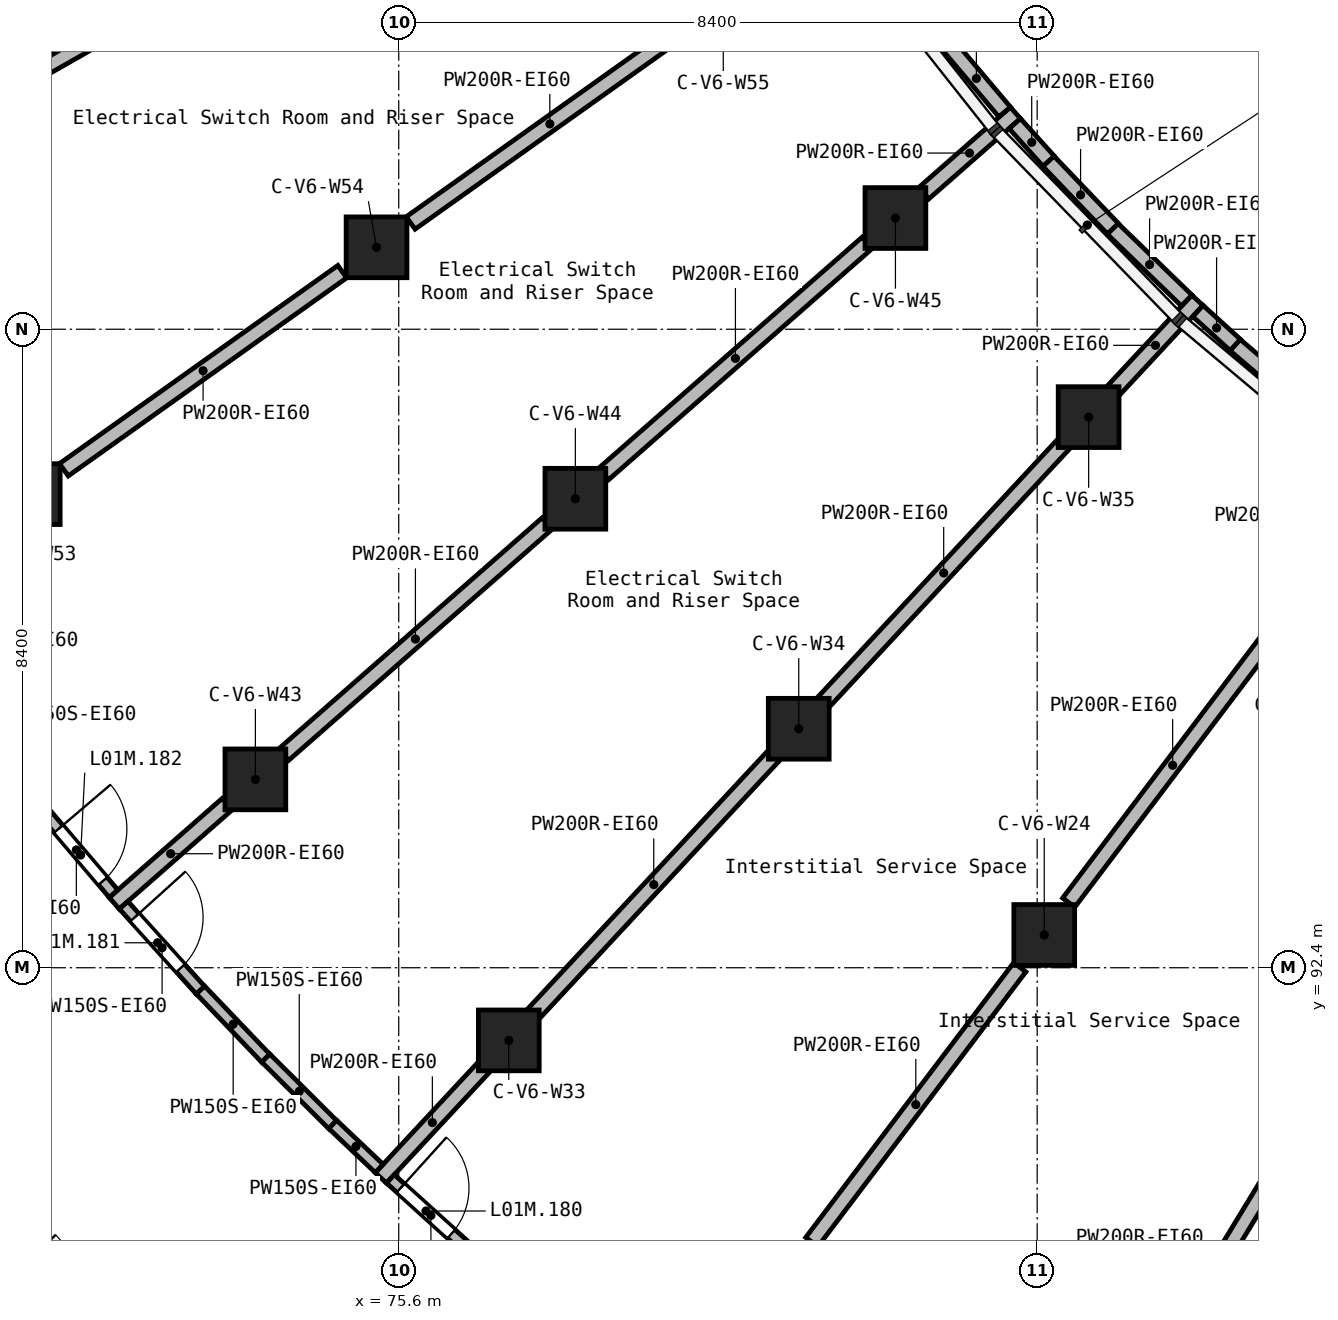
"""IFC4 building model, lengths in metres.
Left out: names, types, materials, properties, quantities, classifications, styles, units other than length and angle.
Written with IfcOpenShell. Run it as: python <this file> out.ifc"""

import sys

from ifc_helpers import new_model, si_unit, direction, frame, frame_2d, origin, origin_2d, place, context, subcontext, project, spatial, rectangle, extrude, element, fill, save


model = new_model("IFC4")
c1 = context("Model", 3, precision=1e-05, world=origin(), true_north=direction((0.0, 1.0)))
c2 = subcontext(c1, "Body", "Model", "MODEL_VIEW")
j1 = project(units=[si_unit("LENGTHUNIT", "METRE"), si_unit("PLANEANGLEUNIT", "RADIAN")], contexts=[c1])
p1 = place(None, origin())
s1 = spatial("IfcSite", under=j1, at=p1, CompositionType="ELEMENT")
p2 = place(p1, origin())
s2 = spatial("IfcBuilding", under=s1, at=p2, CompositionType="ELEMENT")
p3 = place(p2, frame((0.0, 0.0, 9.9)))
s3 = spatial("IfcBuildingStorey", under=s2, at=p3, CompositionType="ELEMENT", Elevation=9.9)
for number, where, z_axis, x_axis in (
    (1, (70.745, 98.631, 0.0), (0.0, 0.0, 1.0), (1.0, 0.0, 0.0)),
    (2, (73.714, 94.878, 0.0), (0.0, 0.0, 1.0), (1.0, 0.0, 0.0)),
    (3, (75.308, 101.878, 0.0), (0.0, 0.0, 1.0), (1.0, 0.0, 0.0)),
    (4, (77.048, 91.444, 0.0), (0.0, 0.0, 1.0), (1.0, 0.0, 0.0)),
    (5, (77.924, 98.57, 0.0), (0.0, 0.0, 1.0), (1.0, 0.0, 0.0)),
    (6, (80.863, 95.544, 0.0), (0.0, 0.0, 1.0), (1.0, 0.0, 0.0)),
    (7, (82.135, 102.263, 0.0), (0.0, 0.0, 1.0), (1.0, 0.0, 0.0)),
    (8, (84.093, 92.831, 0.0), (0.0, 0.0, 1.0), (1.0, 0.0, 0.0)),
    (9, (84.677, 99.644, 0.0), (0.0, 0.0, 1.0), (1.0, 0.0, 0.0)),
):
    element("IfcColumn", number, at=place(p3, frame(where, z_axis=z_axis, x_axis=x_axis)), inside=s3, PredefinedType="COLUMN", context=c2, shape_type="SweptSolid", body=[
        extrude(rectangle(XDim=0.8, YDim=0.8, at=origin_2d()), origin(), (0.0, 0.0, 1.0), 2.7),
    ])
p4 = place(p3, frame((84.945, 86.126, 0.0), z_axis=(0.0, 0.0, 1.0), x_axis=(0.51963838238, 0.854386301129, 0.0)))
e10 = element("IfcWall", 10, at=p4, inside=s3, PredefinedType="SOLIDWALL", context=c2, shape_type="SweptSolid", body=[
    extrude(rectangle(XDim=4.544, YDim=0.2, at=frame_2d((2.272, 0.0))), origin(), (0.0, 0.0, 1.0), 2.45),
])
p5 = place(p3, frame((68.619, 102.921, 0.0), z_axis=(0.0, 0.0, 1.0), x_axis=(0.869273909114, 0.494330730315, 0.0)))
e11 = element("IfcWall", 11, at=p5, inside=s3, PredefinedType="SOLIDWALL", context=c2, shape_type="SweptSolid", body=[
    extrude(rectangle(XDim=4.568, YDim=0.2, at=frame_2d((2.284, 0.0))), origin(), (0.0, 0.0, 1.0), 2.45),
])
p6 = place(p3, frame((81.035, 88.792, 0.0), z_axis=(0.0, 0.0, 1.0), x_axis=(0.603552800748, 0.797323031594, 0.0)))
e12 = element("IfcWall", 12, at=p6, inside=s3, PredefinedType="SOLIDWALL", context=c2, shape_type="SweptSolid", body=[
    extrude(rectangle(XDim=4.533, YDim=0.2, at=frame_2d((2.267, 0.0))), origin(), (0.0, 0.0, 1.0), 2.45),
])
p7 = place(p3, frame((84.415, 93.257, 0.0), z_axis=(0.0, 0.0, 1.0), x_axis=(0.603553756077, 0.797322308434, 0.0)))
e13 = element("IfcWall", 13, at=p7, inside=s3, PredefinedType="SOLIDWALL", context=c2, shape_type="SweptSolid", body=[
    extrude(rectangle(XDim=4.532, YDim=0.2, at=frame_2d((2.266, 0.0))), origin(), (0.0, 0.0, 1.0), 2.45),
])
p8 = place(p3, frame((75.365, 89.635, 0.0), z_axis=(0.0, 0.0, 1.0), x_axis=(0.681114654608, 0.732176773245, 0.0)))
e14 = element("IfcWall", 14, at=p8, inside=s3, PredefinedType="SOLIDWALL", context=c2, shape_type="SweptSolid", body=[
    extrude(rectangle(XDim=1.989, YDim=0.2, at=frame_2d((0.995, 0.0))), origin(), (0.0, 0.0, 1.0), 2.45),
])
p9 = place(p3, frame((77.376, 91.797, 0.0), z_axis=(0.0, 0.0, 1.0), x_axis=(0.681189934363, 0.73210673629, 0.0)))
e15 = element("IfcWall", 15, at=p9, inside=s3, PredefinedType="SOLIDWALL", context=c2, shape_type="SweptSolid", body=[
    extrude(rectangle(XDim=4.637, YDim=0.2, at=frame_2d((2.318, 0.0))), origin(), (0.0, 0.0, 1.0), 2.45),
])
p10 = place(p3, frame((81.191, 95.897, 0.0), z_axis=(0.0, 0.0, 1.0), x_axis=(0.681180116782, 0.732115870952, 0.0)))
e16 = element("IfcWall", 16, at=p10, inside=s3, PredefinedType="SOLIDWALL", context=c2, shape_type="SweptSolid", body=[
    extrude(rectangle(XDim=4.635, YDim=0.2, at=frame_2d((2.317, 0.0))), origin(), (0.0, 0.0, 1.0), 2.45),
])
p11 = place(p3, frame((85.005, 99.996, 0.0), z_axis=(0.0, 0.0, 1.0), x_axis=(0.681162222718, 0.732132519658, 0.0)))
e17 = element("IfcWall", 17, at=p11, inside=s3, PredefinedType="SOLIDWALL", context=c2, shape_type="SweptSolid", body=[
    extrude(rectangle(XDim=1.619, YDim=0.2, at=frame_2d((0.81, 0.0))), origin(), (0.0, 0.0, 1.0), 2.45),
])
for number, where, z_axis, x_axis in (
    (18, (71.195, 98.951, 0.0), (0.0, 0.0, 1.0), (0.815, 0.58, 0.0)),
    (19, (75.757, 102.198, 0.0), (0.0, 0.0, 1.0), (0.815, 0.58, 0.0)),
):
    element("IfcWall", number, at=place(p3, frame(where, z_axis=z_axis, x_axis=x_axis)), inside=s3, PredefinedType="SOLIDWALL", context=c2, shape_type="SweptSolid", body=[
        extrude(rectangle(XDim=4.495, YDim=0.2, at=frame_2d((2.248, 0.0))), origin(), (0.0, 0.0, 1.0), 2.45),
    ])
p12 = place(p3, frame((71.857, 93.249, 0.0), z_axis=(0.0, 0.0, 1.0), x_axis=(0.751795639598, 0.659396175513, 0.0)))
e20 = element("IfcWall", 20, at=p12, inside=s3, PredefinedType="SOLIDWALL", context=c2, shape_type="SweptSolid", body=[
    extrude(rectangle(XDim=1.976, YDim=0.2, at=frame_2d((0.988, 0.0))), origin(), (0.0, 0.0, 1.0), 2.45),
])
p13 = place(p3, frame((74.087, 95.204, 0.0), z_axis=(0.0, 0.0, 1.0), x_axis=(0.751831429018, 0.659355368781, 0.0)))
e21 = element("IfcWall", 21, at=p13, inside=s3, PredefinedType="SOLIDWALL", context=c2, shape_type="SweptSolid", body=[
    extrude(rectangle(XDim=4.61, YDim=0.2, at=frame_2d((2.305, 0.0))), origin(), (0.0, 0.0, 1.0), 2.45),
])
p14 = place(p3, frame((78.296, 98.896, 0.0), z_axis=(0.0, 0.0, 1.0), x_axis=(0.751815287375, 0.659373773871, 0.0)))
e22 = element("IfcWall", 22, at=p14, inside=s3, PredefinedType="SOLIDWALL", context=c2, shape_type="SweptSolid", body=[
    extrude(rectangle(XDim=4.611, YDim=0.2, at=frame_2d((2.306, 0.0))), origin(), (0.0, 0.0, 1.0), 2.45),
])
p15 = place(p3, frame((82.507, 102.589, 0.0), z_axis=(0.0, 0.0, 1.0), x_axis=(0.751793531826, 0.659398578634, 0.0)))
e23 = element("IfcWall", 23, at=p15, inside=s3, PredefinedType="SOLIDWALL", context=c2, shape_type="SweptSolid", body=[
    extrude(rectangle(XDim=1.604, YDim=0.2, at=frame_2d((0.802, 0.0))), origin(), (0.0, 0.0, 1.0), 2.45),
])
p16 = place(p3, frame((84.991, 102.124, 0.0), z_axis=(0.0, 0.0, 1.0), x_axis=(0.718428269031, -0.695601051076, 0.0)))
e24 = element("IfcWall", 24, at=p16, inside=s3, PredefinedType="SOLIDWALL", context=c2, shape_type="SweptSolid", body=[
    extrude(rectangle(XDim=1.358, YDim=0.2, at=frame_2d((0.679, 0.0))), origin(), (0.0, 0.0, 1.0), 2.45),
])
p17 = place(p3, frame((82.828, 104.54, 0.0), z_axis=(0.0, 0.0, 1.0), x_axis=(0.645249445925, -0.76397195795, 0.0)))
e25 = element("IfcWall", 25, at=p17, inside=s3, PredefinedType="SOLIDWALL", context=c2, shape_type="SweptSolid", body=[
    extrude(rectangle(XDim=1.154, YDim=0.2, at=frame_2d((0.577, 0.0))), origin(), (0.0, 0.0, 1.0), 2.45),
])
p18 = place(p3, frame((84.146, 103.012, 0.0), z_axis=(0.0, 0.0, 1.0), x_axis=(0.691353330866, -0.722516831569, 0.0)))
e26 = element("IfcWall", 26, at=p18, inside=s3, PredefinedType="SOLIDWALL", context=c2, shape_type="SweptSolid", body=[
    extrude(rectangle(XDim=1.23, YDim=0.2, at=frame_2d((0.615, 0.0))), origin(), (0.0, 0.0, 1.0), 2.45),
])
p19 = place(p3, frame((86.602, 100.594, 0.0), z_axis=(0.0, 0.0, 1.0), x_axis=(0.760081654582, -0.649827575875, 0.0)))
e27 = element("IfcWall", 27, at=p19, inside=s3, PredefinedType="SOLIDWALL", context=c2, shape_type="SweptSolid", body=[
    extrude(rectangle(XDim=1.127, YDim=0.2, at=frame_2d((0.563, 0.0))), origin(), (0.0, 0.0, 1.0), 2.45),
])
p20 = place(p3, frame((83.706, 103.506, 0.0), z_axis=(0.0, 0.0, 1.0), x_axis=(0.669188156852, -0.743093002746, 0.0)))
e28 = element("IfcWall", 28, at=p20, inside=s3, PredefinedType="SOLIDWALL", context=c2, shape_type="SweptSolid", body=[
    extrude(rectangle(XDim=0.664, YDim=0.2, at=frame_2d((0.332, 0.0))), origin(), (0.0, 0.0, 1.0), 2.45),
])
p21 = place(p3, frame((86.115, 101.04, 0.0), z_axis=(0.0, 0.0, 1.0), x_axis=(0.740506033946, -0.672049710728, 0.0)))
e29 = element("IfcWall", 29, at=p21, inside=s3, PredefinedType="SOLIDWALL", context=c2, shape_type="SweptSolid", body=[
    extrude(rectangle(XDim=0.663, YDim=0.2, at=frame_2d((0.332, 0.0))), origin(), (0.0, 0.0, 1.0), 2.45),
])
p22 = place(p3, frame((70.868, 94.525, 0.0), z_axis=(0.0, 0.0, 1.0), x_axis=(0.648178462951, -0.761488463581, 0.0)))
e30 = element("IfcWall", 30, at=p22, inside=s3, PredefinedType="PARTITIONING", context=c2, shape_type="SweptSolid", body=[
    extrude(rectangle(XDim=1.51, YDim=0.15, at=frame_2d((0.755, 0.0))), origin(), (0.0, 0.0, 1.0), 2.45),
])
p23 = place(p22, frame((0.393, 0.0, 0.0)))
e31 = element("IfcOpeningElement", 31, at=p23, cuts=e30, PredefinedType="OPENING", context=c2, shape_type="SweptSolid", body=[
    extrude(rectangle(XDim=0.9, YDim=2.1, at=frame_2d((0.45, 1.05))), frame((0.0, 0.085, 0.0), z_axis=(0.0, -1.0, 0.0), x_axis=(1.0, 0.0, 0.0)), (0.0, 0.0, 1.0), 0.17),
])
p24 = place(p3, frame((71.981, 93.223, 0.0), z_axis=(0.0, 0.0, 1.0), x_axis=(0.670358116646, -0.742037731822, 0.0)))
e32 = element("IfcWall", 32, at=p24, inside=s3, PredefinedType="PARTITIONING", context=c2, shape_type="SweptSolid", body=[
    extrude(rectangle(XDim=1.509, YDim=0.15, at=frame_2d((0.754, 0.0))), origin(), (0.0, 0.0, 1.0), 2.45),
])
p25 = place(p24, frame((0.216, 0.0, 0.0)))
e33 = element("IfcOpeningElement", 33, at=p25, cuts=e32, PredefinedType="OPENING", context=c2, shape_type="SweptSolid", body=[
    extrude(rectangle(XDim=0.9, YDim=2.1, at=frame_2d((0.45, 1.05))), frame((0.0, 0.085, 0.0), z_axis=(0.0, -1.0, 0.0), x_axis=(1.0, 0.0, 0.0)), (0.0, 0.0, 1.0), 0.17),
])
p26 = place(p3, frame((75.491, 89.622, 0.0), z_axis=(0.0, 0.0, 1.0), x_axis=(0.741422992507, -0.671037961804, 0.0)))
e34 = element("IfcWall", 34, at=p26, inside=s3, PredefinedType="PARTITIONING", context=c2, shape_type="SweptSolid", body=[
    extrude(rectangle(XDim=1.436, YDim=0.15, at=frame_2d((0.718, 0.0))), origin(), (0.0, 0.0, 1.0), 2.45),
])
p27 = place(p26, frame((0.18, 0.0, 0.0)))
e35 = element("IfcOpeningElement", 35, at=p27, cuts=e34, PredefinedType="OPENING", context=c2, shape_type="SweptSolid", body=[
    extrude(rectangle(XDim=0.9, YDim=2.1, at=frame_2d((0.45, 1.05))), frame((0.0, 0.085, 0.0), z_axis=(0.0, -1.0, 0.0), x_axis=(1.0, 0.0, 0.0)), (0.0, 0.0, 1.0), 0.17),
])
p28 = place(p3, frame((72.992, 92.106, 0.0), z_axis=(0.0, 0.0, 1.0), x_axis=(0.691204791727, -0.722658934695, 0.0)))
e36 = element("IfcWall", 36, at=p28, inside=s3, PredefinedType="PARTITIONING", context=c2, shape_type="SweptSolid", body=[
    extrude(rectangle(XDim=1.242, YDim=0.15, at=frame_2d((0.621, 0.0))), origin(), (0.0, 0.0, 1.0), 2.45),
])
p29 = place(p3, frame((73.851, 91.211, 0.0), z_axis=(0.0, 0.0, 1.0), x_axis=(0.709168733207, -0.70503879882, 0.0)))
e37 = element("IfcWall", 37, at=p29, inside=s3, PredefinedType="PARTITIONING", context=c2, shape_type="SweptSolid", body=[
    extrude(rectangle(XDim=1.241, YDim=0.15, at=frame_2d((0.621, 0.0))), origin(), (0.0, 0.0, 1.0), 2.45),
])
p30 = place(p3, frame((74.731, 90.339, 0.0), z_axis=(0.0, 0.0, 1.0), x_axis=(0.72611255532, -0.687575855457, 0.0)))
e38 = element("IfcWall", 38, at=p30, inside=s3, PredefinedType="PARTITIONING", context=c2, shape_type="SweptSolid", body=[
    extrude(rectangle(XDim=0.843, YDim=0.15, at=frame_2d((0.421, 0.0))), origin(), (0.0, 0.0, 1.0), 2.45),
])
p31 = place(p27, origin())
e39 = element("IfcDoor", 39, at=p31, inside=s3, OperationType="SINGLE_SWING_LEFT", PredefinedType="DOOR", context=c2, shape_type="SweptSolid", body=[
    extrude(rectangle(XDim=0.9, YDim=2.1, at=frame_2d((0.45, 1.05))), frame((0.0, 0.025, 0.0), z_axis=(0.0, -1.0, 0.0), x_axis=(1.0, 0.0, 0.0)), (0.0, 0.0, 1.0), 0.05),
])
fill(e35, e39)
p32 = place(p25, origin())
e40 = element("IfcDoor", 40, at=p32, inside=s3, OperationType="SINGLE_SWING_LEFT", PredefinedType="DOOR", context=c2, shape_type="SweptSolid", body=[
    extrude(rectangle(XDim=0.9, YDim=2.1, at=frame_2d((0.45, 1.05))), frame((0.0, 0.025, 0.0), z_axis=(0.0, -1.0, 0.0), x_axis=(1.0, 0.0, 0.0)), (0.0, 0.0, 1.0), 0.05),
])
fill(e33, e40)
p33 = place(p23, origin())
e41 = element("IfcDoor", 41, at=p33, inside=s3, OperationType="SINGLE_SWING_RIGHT", PredefinedType="DOOR", context=c2, shape_type="SweptSolid", body=[
    extrude(rectangle(XDim=0.9, YDim=2.1, at=frame_2d((0.45, 1.05))), frame((0.0, 0.025, 0.0), z_axis=(0.0, -1.0, 0.0), x_axis=(1.0, 0.0, 0.0)), (0.0, 0.0, 1.0), 0.05),
])
fill(e31, e41)
save(model, sys.argv[1])
